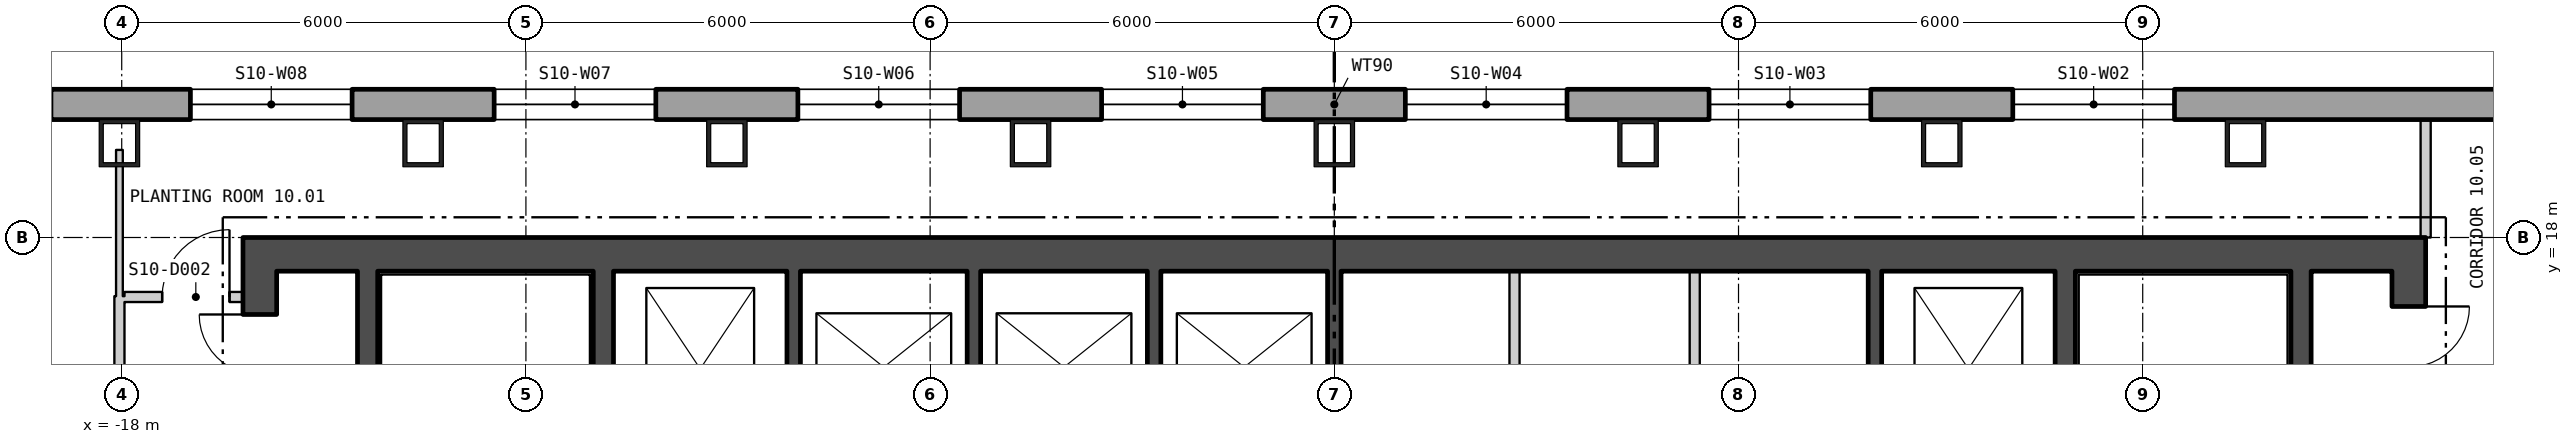
"""IFC4 building model, lengths in metres.
Left out: names, types, materials, properties, quantities, classifications, styles, units other than length and angle.
Written with IfcOpenShell. Run it as: python <this file> out.ifc"""

import sys

from ifc_helpers import new_model, si_unit, direction, frame, frame_2d, origin, origin_2d, place, context, subcontext, project, spatial, polyline, rectangle, hollow_rectangle, outline, extrude, element, fill, save


model = new_model("IFC4")
c1 = context("Model", 3, precision=1e-05, world=origin(), true_north=direction((0.0, 1.0)))
c2 = subcontext(c1, "Body", "Model", "MODEL_VIEW")
j1 = project(units=[si_unit("LENGTHUNIT", "METRE"), si_unit("PLANEANGLEUNIT", "RADIAN")], contexts=[c1])
p1 = place(None, origin())
s1 = spatial("IfcSite", under=j1, at=p1, CompositionType="ELEMENT")
p2 = place(p1, origin())
s2 = spatial("IfcBuilding", under=s1, at=p2, CompositionType="ELEMENT")
p3 = place(p2, frame((0.0, 0.0, 139.8)))
s3 = spatial("IfcBuildingStorey", under=s2, at=p3, CompositionType="ELEMENT", Elevation=139.8)
for number, where, z_axis, x_axis in (
    (1, (13.526, 19.4, 0.0), (0.0, 0.0, 1.0), (-1.0, 0.0, 0.0)),
    (2, (9.017, 19.4, 0.0), (0.0, 0.0, 1.0), (-1.0, 0.0, 0.0)),
    (3, (4.509, 19.4, 0.0), (0.0, 0.0, 1.0), (-1.0, 0.0, 0.0)),
    (4, (0.0, 19.4, 0.0), (0.0, 0.0, 1.0), (-1.0, 0.0, 0.0)),
    (5, (-4.509, 19.4, 0.0), (0.0, 0.0, 1.0), (-1.0, 0.0, 0.0)),
    (6, (-9.017, 19.4, 0.0), (0.0, 0.0, 1.0), (-1.0, 0.0, 0.0)),
    (7, (-13.526, 19.4, 0.0), (0.0, 0.0, 1.0), (-1.0, 0.0, 0.0)),
    (8, (-18.034, 19.4, 0.0), (0.0, 0.0, 1.0), (-1.0, 0.0, 0.0)),
):
    element("IfcColumn", number, at=place(p3, frame(where, z_axis=z_axis, x_axis=x_axis)), inside=s3, PredefinedType="COLUMN", context=c2, shape_type="SweptSolid", body=[
        extrude(hollow_rectangle(XDim=0.6, YDim=0.7, WallThickness=0.06, at=origin_2d()), origin(), (0.0, 0.0, 1.0), 3.9),
    ])
p4 = place(p3, frame((22.875, 19.975, -0.4), z_axis=(0.0, 0.0, 1.0), x_axis=(-1.0, 0.0, 0.0)))
e9 = element("IfcWall", 9, at=p4, inside=s3, PredefinedType="SOLIDWALL", context=c2, shape_type="SweptSolid", body=[
    extrude(outline(polyline([(-0.13, -0.225), (45.88, -0.225), (45.62, 0.225), (0.13, 0.225), (-0.13, -0.225)])), origin(), (0.0, 0.0, 1.0), 3.9),
])
p5 = place(p4, frame((1.425, 0.0, 1.3)))
e10 = element("IfcOpeningElement", 10, at=p5, cuts=e9, PredefinedType="OPENING", context=c2, shape_type="SweptSolid", body=[
    extrude(rectangle(XDim=2.4, YDim=2.0, at=frame_2d((1.2, 1.0))), frame((0.0, 0.235, 0.0), z_axis=(0.0, -1.0, 0.0), x_axis=(1.0, 0.0, 0.0)), (0.0, 0.0, 1.0), 0.47),
])
p6 = place(p4, frame((10.403, 0.0, 1.3)))
e11 = element("IfcOpeningElement", 11, at=p6, cuts=e9, PredefinedType="OPENING", context=c2, shape_type="SweptSolid", body=[
    extrude(rectangle(XDim=2.4, YDim=2.0, at=frame_2d((1.2, 1.0))), frame((0.0, 0.235, 0.0), z_axis=(0.0, -1.0, 0.0), x_axis=(1.0, 0.0, 0.0)), (0.0, 0.0, 1.0), 0.47),
])
p7 = place(p4, frame((14.912, 0.0, 1.3)))
e12 = element("IfcOpeningElement", 12, at=p7, cuts=e9, PredefinedType="OPENING", context=c2, shape_type="SweptSolid", body=[
    extrude(rectangle(XDim=2.4, YDim=2.0, at=frame_2d((1.2, 1.0))), frame((0.0, 0.235, 0.0), z_axis=(0.0, -1.0, 0.0), x_axis=(1.0, 0.0, 0.0)), (0.0, 0.0, 1.0), 0.47),
])
p8 = place(p4, frame((19.421, 0.0, 1.3)))
e13 = element("IfcOpeningElement", 13, at=p8, cuts=e9, PredefinedType="OPENING", context=c2, shape_type="SweptSolid", body=[
    extrude(rectangle(XDim=2.4, YDim=2.0, at=frame_2d((1.2, 1.0))), frame((0.0, 0.235, 0.0), z_axis=(0.0, -1.0, 0.0), x_axis=(1.0, 0.0, 0.0)), (0.0, 0.0, 1.0), 0.47),
])
p9 = place(p4, frame((23.929, 0.0, 1.3)))
e14 = element("IfcOpeningElement", 14, at=p9, cuts=e9, PredefinedType="OPENING", context=c2, shape_type="SweptSolid", body=[
    extrude(rectangle(XDim=2.4, YDim=2.0, at=frame_2d((1.2, 1.0))), frame((0.0, 0.235, 0.0), z_axis=(0.0, -1.0, 0.0), x_axis=(1.0, 0.0, 0.0)), (0.0, 0.0, 1.0), 0.47),
])
p10 = place(p4, frame((28.438, 0.0, 1.3)))
e15 = element("IfcOpeningElement", 15, at=p10, cuts=e9, PredefinedType="OPENING", context=c2, shape_type="SweptSolid", body=[
    extrude(rectangle(XDim=2.4, YDim=2.0, at=frame_2d((1.2, 1.0))), frame((0.0, 0.235, 0.0), z_axis=(0.0, -1.0, 0.0), x_axis=(1.0, 0.0, 0.0)), (0.0, 0.0, 1.0), 0.47),
])
p11 = place(p4, frame((32.947, 0.0, 1.3)))
e16 = element("IfcOpeningElement", 16, at=p11, cuts=e9, PredefinedType="OPENING", context=c2, shape_type="SweptSolid", body=[
    extrude(rectangle(XDim=2.4, YDim=2.0, at=frame_2d((1.2, 1.0))), frame((0.0, 0.235, 0.0), z_axis=(0.0, -1.0, 0.0), x_axis=(1.0, 0.0, 0.0)), (0.0, 0.0, 1.0), 0.47),
])
p12 = place(p4, frame((37.455, 0.0, 1.3)))
e17 = element("IfcOpeningElement", 17, at=p12, cuts=e9, PredefinedType="OPENING", context=c2, shape_type="SweptSolid", body=[
    extrude(rectangle(XDim=2.4, YDim=2.0, at=frame_2d((1.2, 1.0))), frame((0.0, 0.235, 0.0), z_axis=(0.0, -1.0, 0.0), x_axis=(1.0, 0.0, 0.0)), (0.0, 0.0, 1.0), 0.47),
])
p13 = place(p4, frame((41.925, 0.0, 1.3)))
e18 = element("IfcOpeningElement", 18, at=p13, cuts=e9, PredefinedType="OPENING", context=c2, shape_type="SweptSolid", body=[
    extrude(rectangle(XDim=2.4, YDim=2.0, at=frame_2d((1.2, 1.0))), frame((0.0, 0.235, 0.0), z_axis=(0.0, -1.0, 0.0), x_axis=(1.0, 0.0, 0.0)), (0.0, 0.0, 1.0), 0.47),
])
p14 = place(p3, frame((-16.2, 17.75, 0.0), z_axis=(0.0, 0.0, 1.0), x_axis=(1.0, 0.0, 0.0)))
e19 = element("IfcWall", 19, at=p14, inside=s3, PredefinedType="SHEAR", context=c2, shape_type="SweptSolid", body=[
    extrude(rectangle(XDim=32.4, YDim=0.5, at=frame_2d((16.2, 0.0))), origin(), (0.0, 0.0, 1.0), 3.7),
])
p15 = place(p3, frame((-15.95, 2.5, 0.0), z_axis=(0.0, 0.0, 1.0), x_axis=(0.0, 1.0, 0.0)))
e20 = element("IfcWall", 20, at=p15, inside=s3, PredefinedType="SHEAR", context=c2, shape_type="SweptSolid", body=[
    extrude(rectangle(XDim=15.0, YDim=0.5, at=frame_2d((7.5, 0.0))), origin(), (0.0, 0.0, 1.0), 3.7),
])
p16 = place(p15, frame((4.35, 0.0, 0.0)))
e21 = element("IfcOpeningElement", 21, at=p16, cuts=e20, PredefinedType="OPENING", context=c2, shape_type="SweptSolid", body=[
    extrude(rectangle(XDim=1.5, YDim=2.1, at=frame_2d((0.75, 1.05))), frame((0.0, 0.26, 0.0), z_axis=(0.0, -1.0, 0.0), x_axis=(1.0, 0.0, 0.0)), (0.0, 0.0, 1.0), 0.52),
])
p17 = place(p15, frame((0.825, 0.0, 0.0)))
e22 = element("IfcOpeningElement", 22, at=p17, cuts=e20, PredefinedType="OPENING", context=c2, shape_type="SweptSolid", body=[
    extrude(rectangle(XDim=0.9, YDim=2.1, at=frame_2d((0.45, 1.05))), frame((0.0, 0.26, 0.0), z_axis=(0.0, -1.0, 0.0), x_axis=(1.0, 0.0, 0.0)), (0.0, 0.0, 1.0), 0.52),
])
p18 = place(p15, frame((2.95, 0.0, 0.0)))
e23 = element("IfcOpeningElement", 23, at=p18, cuts=e20, PredefinedType="OPENING", context=c2, shape_type="SweptSolid", body=[
    extrude(rectangle(XDim=1.0, YDim=2.1, at=frame_2d((0.5, 1.05))), frame((0.0, 0.26, 0.0), z_axis=(0.0, -1.0, 0.0), x_axis=(1.0, 0.0, 0.0)), (0.0, 0.0, 1.0), 0.52),
])
p19 = place(p15, frame((8.882, 0.0, 0.0)))
e24 = element("IfcOpeningElement", 24, at=p19, cuts=e20, PredefinedType="OPENING", context=c2, shape_type="SweptSolid", body=[
    extrude(rectangle(XDim=0.9, YDim=2.1, at=frame_2d((0.45, 1.05))), frame((0.0, 0.26, 0.0), z_axis=(0.0, -1.0, 0.0), x_axis=(1.0, 0.0, 0.0)), (0.0, 0.0, 1.0), 0.52),
])
p20 = place(p15, frame((13.457, 0.0, 0.0)))
e25 = element("IfcOpeningElement", 25, at=p20, cuts=e20, PredefinedType="OPENING", context=c2, shape_type="SweptSolid", body=[
    extrude(rectangle(XDim=0.9, YDim=2.1, at=frame_2d((0.45, 1.05))), frame((0.0, 0.26, 0.0), z_axis=(0.0, -1.0, 0.0), x_axis=(1.0, 0.0, 0.0)), (0.0, 0.0, 1.0), 0.52),
])
p21 = place(p3, frame((15.95, 2.5, 0.0), z_axis=(0.0, 0.0, 1.0), x_axis=(0.0, 1.0, 0.0)))
e26 = element("IfcWall", 26, at=p21, inside=s3, PredefinedType="SHEAR", context=c2, shape_type="SweptSolid", body=[
    extrude(rectangle(XDim=15.0, YDim=0.5, at=frame_2d((7.5, 0.0))), origin(), (0.0, 0.0, 1.0), 3.7),
])
p22 = place(p21, frame((4.35, 0.0, 0.0)))
e27 = element("IfcOpeningElement", 27, at=p22, cuts=e26, PredefinedType="OPENING", context=c2, shape_type="SweptSolid", body=[
    extrude(rectangle(XDim=1.5, YDim=2.1, at=frame_2d((0.75, 1.05))), frame((0.0, 0.26, 0.0), z_axis=(0.0, -1.0, 0.0), x_axis=(1.0, 0.0, 0.0)), (0.0, 0.0, 1.0), 0.52),
])
p23 = place(p21, frame((0.4, 0.0, 0.0)))
e28 = element("IfcOpeningElement", 28, at=p23, cuts=e26, PredefinedType="OPENING", context=c2, shape_type="SweptSolid", body=[
    extrude(rectangle(XDim=1.0, YDim=2.1, at=frame_2d((0.5, 1.05))), frame((0.0, 0.26, 0.0), z_axis=(0.0, -1.0, 0.0), x_axis=(1.0, 0.0, 0.0)), (0.0, 0.0, 1.0), 0.52),
])
p24 = place(p21, frame((2.475, 0.0, 0.0)))
e29 = element("IfcOpeningElement", 29, at=p24, cuts=e26, PredefinedType="OPENING", context=c2, shape_type="SweptSolid", body=[
    extrude(rectangle(XDim=0.9, YDim=2.1, at=frame_2d((0.45, 1.05))), frame((0.0, 0.26, 0.0), z_axis=(0.0, -1.0, 0.0), x_axis=(1.0, 0.0, 0.0)), (0.0, 0.0, 1.0), 0.52),
])
p25 = place(p21, frame((9.001, 0.0, 0.0)))
e30 = element("IfcOpeningElement", 30, at=p25, cuts=e26, PredefinedType="OPENING", context=c2, shape_type="SweptSolid", body=[
    extrude(rectangle(XDim=0.9, YDim=2.1, at=frame_2d((0.45, 1.05))), frame((0.0, 0.26, 0.0), z_axis=(0.0, -1.0, 0.0), x_axis=(1.0, 0.0, 0.0)), (0.0, 0.0, 1.0), 0.52),
])
p26 = place(p21, frame((13.576, 0.0, 0.0)))
e31 = element("IfcOpeningElement", 31, at=p26, cuts=e26, PredefinedType="OPENING", context=c2, shape_type="SweptSolid", body=[
    extrude(rectangle(XDim=0.9, YDim=2.1, at=frame_2d((0.45, 1.05))), frame((0.0, 0.26, 0.0), z_axis=(0.0, -1.0, 0.0), x_axis=(1.0, 0.0, 0.0)), (0.0, 0.0, 1.0), 0.52),
])
p27 = place(p3, frame((-10.85, 2.5, 0.0), z_axis=(0.0, 0.0, 1.0), x_axis=(0.0, 1.0, 0.0)))
e32 = element("IfcWall", 32, at=p27, inside=s3, PredefinedType="SHEAR", context=c2, shape_type="SweptSolid", body=[
    extrude(rectangle(XDim=15.0, YDim=0.3, at=frame_2d((7.5, 0.0))), origin(), (0.0, 0.0, 1.0), 3.7),
])
p28 = place(p27, frame((3.475, 0.0, 0.0)))
e33 = element("IfcOpeningElement", 33, at=p28, cuts=e32, PredefinedType="OPENING", context=c2, shape_type="SweptSolid", body=[
    extrude(rectangle(XDim=1.25, YDim=2.1, at=frame_2d((0.625, 1.05))), frame((0.0, 0.16, 0.0), z_axis=(0.0, -1.0, 0.0), x_axis=(1.0, 0.0, 0.0)), (0.0, 0.0, 1.0), 0.32),
])
p29 = place(p27, frame((1.125, 0.0, 0.0)))
e34 = element("IfcOpeningElement", 34, at=p29, cuts=e32, PredefinedType="OPENING", context=c2, shape_type="SweptSolid", body=[
    extrude(rectangle(XDim=1.0, YDim=2.1, at=frame_2d((0.5, 1.05))), frame((0.0, 0.16, 0.0), z_axis=(0.0, -1.0, 0.0), x_axis=(1.0, 0.0, 0.0)), (0.0, 0.0, 1.0), 0.32),
])
p30 = place(p3, frame((-14.35, 2.5, 0.0), z_axis=(0.0, 0.0, 1.0), x_axis=(0.0, 1.0, 0.0)))
e35 = element("IfcWall", 35, at=p30, inside=s3, PredefinedType="SHEAR", context=c2, shape_type="SweptSolid", body=[
    extrude(rectangle(XDim=15.0, YDim=0.3, at=frame_2d((7.5, 0.0))), origin(), (0.0, 0.0, 1.0), 3.7),
])
p31 = place(p30, frame((4.35, 0.0, 0.0)))
e36 = element("IfcOpeningElement", 36, at=p31, cuts=e35, PredefinedType="OPENING", context=c2, shape_type="SweptSolid", body=[
    extrude(rectangle(XDim=1.5, YDim=2.1, at=frame_2d((0.75, 1.05))), frame((0.0, 0.16, 0.0), z_axis=(0.0, -1.0, 0.0), x_axis=(1.0, 0.0, 0.0)), (0.0, 0.0, 1.0), 0.32),
])
p32 = place(p3, frame((10.85, 2.5, 0.0), z_axis=(0.0, 0.0, 1.0), x_axis=(0.0, 1.0, 0.0)))
e37 = element("IfcWall", 37, at=p32, inside=s3, PredefinedType="SHEAR", context=c2, shape_type="SweptSolid", body=[
    extrude(rectangle(XDim=15.0, YDim=0.3, at=frame_2d((7.5, 0.0))), origin(), (0.0, 0.0, 1.0), 3.7),
])
p33 = place(p32, frame((3.475, 0.0, 0.0)))
e38 = element("IfcOpeningElement", 38, at=p33, cuts=e37, PredefinedType="OPENING", context=c2, shape_type="SweptSolid", body=[
    extrude(rectangle(XDim=1.25, YDim=2.1, at=frame_2d((0.625, 1.05))), frame((0.0, 0.16, 0.0), z_axis=(0.0, -1.0, 0.0), x_axis=(1.0, 0.0, 0.0)), (0.0, 0.0, 1.0), 0.32),
])
p34 = place(p32, frame((1.125, 0.0, 0.0)))
e39 = element("IfcOpeningElement", 39, at=p34, cuts=e37, PredefinedType="OPENING", context=c2, shape_type="SweptSolid", body=[
    extrude(rectangle(XDim=1.0, YDim=2.1, at=frame_2d((0.5, 1.05))), frame((0.0, 0.16, 0.0), z_axis=(0.0, -1.0, 0.0), x_axis=(1.0, 0.0, 0.0)), (0.0, 0.0, 1.0), 0.32),
])
p35 = place(p3, frame((14.35, 2.5, 0.0), z_axis=(0.0, 0.0, 1.0), x_axis=(0.0, 1.0, 0.0)))
e40 = element("IfcWall", 40, at=p35, inside=s3, PredefinedType="SHEAR", context=c2, shape_type="SweptSolid", body=[
    extrude(rectangle(XDim=15.0, YDim=0.3, at=frame_2d((7.5, 0.0))), origin(), (0.0, 0.0, 1.0), 3.7),
])
p36 = place(p35, frame((4.35, 0.0, 0.0)))
e41 = element("IfcOpeningElement", 41, at=p36, cuts=e40, PredefinedType="OPENING", context=c2, shape_type="SweptSolid", body=[
    extrude(rectangle(XDim=1.5, YDim=2.1, at=frame_2d((0.75, 1.05))), frame((0.0, 0.16, 0.0), z_axis=(0.0, -1.0, 0.0), x_axis=(1.0, 0.0, 0.0)), (0.0, 0.0, 1.0), 0.32),
])
for number, where, z_axis, x_axis in (
    (42, (-8.025, 14.7, 0.0), (0.0, 0.0, 1.0), (0.0, 1.0, 0.0)),
    (43, (-5.35, 14.7, 0.0), (0.0, 0.0, 1.0), (0.0, 1.0, 0.0)),
    (44, (-2.675, 14.7, 0.0), (0.0, 0.0, 1.0), (0.0, 1.0, 0.0)),
    (45, (0.0, 14.7, 0.0), (0.0, 0.0, 1.0), (0.0, 1.0, 0.0)),
):
    element("IfcWall", number, at=place(p3, frame(where, z_axis=z_axis, x_axis=x_axis)), inside=s3, PredefinedType="SHEAR", context=c2, shape_type="SweptSolid", body=[
        extrude(rectangle(XDim=2.8, YDim=0.2, at=frame_2d((1.4, 0.0))), origin(), (0.0, 0.0, 1.0), 3.7),
    ])
for number, where, z_axis, x_axis in (
    (46, (2.675, 14.7, 0.0), (0.0, 0.0, 1.0), (0.0, 1.0, 0.0)),
    (47, (5.35, 14.7, 0.0), (0.0, 0.0, 1.0), (0.0, 1.0, 0.0)),
):
    element("IfcWall", number, at=place(p3, frame(where, z_axis=z_axis, x_axis=x_axis)), inside=s3, PredefinedType="PARTITIONING", context=c2, shape_type="SweptSolid", body=[
        extrude(rectangle(XDim=2.8, YDim=0.15, at=frame_2d((1.4, 0.0))), origin(), (0.0, 0.0, 1.0), 3.7),
    ])
p37 = place(p3, frame((8.025, 14.7, 0.0), z_axis=(0.0, 0.0, 1.0), x_axis=(0.0, 1.0, 0.0)))
e48 = element("IfcWall", 48, at=p37, inside=s3, PredefinedType="SHEAR", context=c2, shape_type="SweptSolid", body=[
    extrude(rectangle(XDim=2.8, YDim=0.2, at=frame_2d((1.4, 0.0))), origin(), (0.0, 0.0, 1.0), 3.7),
])
p38 = place(p3, frame((-18.034, 12.146, 0.0), z_axis=(0.0, 0.0, 1.0), x_axis=(0.0, 1.0, 0.0)))
e49 = element("IfcWall", 49, at=p38, inside=s3, PredefinedType="PARTITIONING", context=c2, shape_type="SweptSolid", body=[
    extrude(rectangle(XDim=4.983, YDim=0.15, at=frame_2d((2.491, 0.0))), origin(), (0.0, 0.0, 1.0), 3.7),
])
p39 = place(p38, frame((1.916, 0.0, 0.0)))
e50 = element("IfcOpeningElement", 50, at=p39, cuts=e49, PredefinedType="OPENING", context=c2, shape_type="SweptSolid", body=[
    extrude(rectangle(XDim=1.0, YDim=2.1, at=frame_2d((0.5, 1.05))), frame((0.0, 0.085, 0.0), z_axis=(0.0, -1.0, 0.0), x_axis=(1.0, 0.0, 0.0)), (0.0, 0.0, 1.0), 0.17),
])
p40 = place(p3, frame((-18.034, 17.129, 0.0), z_axis=(0.0, 0.0, 1.0), x_axis=(0.0, 1.0, 0.0)))
e51 = element("IfcWall", 51, at=p40, inside=s3, PredefinedType="PARTITIONING", context=c2, shape_type="SweptSolid", body=[
    extrude(rectangle(XDim=2.171, YDim=0.1, at=frame_2d((1.085, 0.0))), origin(), (0.0, 0.0, 1.0), 3.7),
])
p41 = place(p3, frame((-17.959, 17.117, 0.0), z_axis=(0.0, 0.0, 1.0), x_axis=(1.0, 0.0, 0.0)))
e52 = element("IfcWall", 52, at=p41, inside=s3, PredefinedType="PARTITIONING", context=c2, shape_type="SweptSolid", body=[
    extrude(rectangle(XDim=1.759, YDim=0.15, at=frame_2d((0.879, 0.0))), origin(), (0.0, 0.0, 1.0), 3.7),
])
p42 = place(p41, frame((0.559, 0.0, 0.0)))
e53 = element("IfcOpeningElement", 53, at=p42, cuts=e52, PredefinedType="OPENING", context=c2, shape_type="SweptSolid", body=[
    extrude(rectangle(XDim=1.0, YDim=2.1, at=frame_2d((0.5, 1.05))), frame((0.0, 0.085, 0.0), z_axis=(0.0, -1.0, 0.0), x_axis=(1.0, 0.0, 0.0)), (0.0, 0.0, 1.0), 0.17),
])
p43 = place(p3, frame((16.2, 18.0, 0.0), z_axis=(0.0, 0.0, 1.0), x_axis=(0.0, 1.0, 0.0)))
e54 = element("IfcWall", 54, at=p43, inside=s3, PredefinedType="PARTITIONING", context=c2, shape_type="SweptSolid", body=[
    extrude(rectangle(XDim=1.75, YDim=0.15, at=frame_2d((0.875, 0.0))), origin(), (0.0, 0.0, 1.0), 3.7),
])
p44 = place(p6, origin())
e55 = element("IfcWindow", 55, at=p44, inside=s3, PartitioningType="SINGLE_PANEL", PredefinedType="WINDOW", context=c2, shape_type="SweptSolid", body=[
    extrude(rectangle(XDim=2.4, YDim=2.0, at=frame_2d((1.2, 1.0))), frame((0.0, 0.105, 0.0), z_axis=(0.0, -1.0, 0.0), x_axis=(1.0, 0.0, 0.0)), (0.0, 0.0, 1.0), 0.06),
])
fill(e11, e55)
p45 = place(p7, origin())
e56 = element("IfcWindow", 56, at=p45, inside=s3, PartitioningType="SINGLE_PANEL", PredefinedType="WINDOW", context=c2, shape_type="SweptSolid", body=[
    extrude(rectangle(XDim=2.4, YDim=2.0, at=frame_2d((1.2, 1.0))), frame((0.0, 0.105, 0.0), z_axis=(0.0, -1.0, 0.0), x_axis=(1.0, 0.0, 0.0)), (0.0, 0.0, 1.0), 0.06),
])
fill(e12, e56)
p46 = place(p8, origin())
e57 = element("IfcWindow", 57, at=p46, inside=s3, PartitioningType="SINGLE_PANEL", PredefinedType="WINDOW", context=c2, shape_type="SweptSolid", body=[
    extrude(rectangle(XDim=2.4, YDim=2.0, at=frame_2d((1.2, 1.0))), frame((0.0, 0.105, 0.0), z_axis=(0.0, -1.0, 0.0), x_axis=(1.0, 0.0, 0.0)), (0.0, 0.0, 1.0), 0.06),
])
fill(e13, e57)
p47 = place(p9, origin())
e58 = element("IfcWindow", 58, at=p47, inside=s3, PartitioningType="SINGLE_PANEL", PredefinedType="WINDOW", context=c2, shape_type="SweptSolid", body=[
    extrude(rectangle(XDim=2.4, YDim=2.0, at=frame_2d((1.2, 1.0))), frame((0.0, 0.105, 0.0), z_axis=(0.0, -1.0, 0.0), x_axis=(1.0, 0.0, 0.0)), (0.0, 0.0, 1.0), 0.06),
])
fill(e14, e58)
p48 = place(p10, origin())
e59 = element("IfcWindow", 59, at=p48, inside=s3, PartitioningType="SINGLE_PANEL", PredefinedType="WINDOW", context=c2, shape_type="SweptSolid", body=[
    extrude(rectangle(XDim=2.4, YDim=2.0, at=frame_2d((1.2, 1.0))), frame((0.0, 0.105, 0.0), z_axis=(0.0, -1.0, 0.0), x_axis=(1.0, 0.0, 0.0)), (0.0, 0.0, 1.0), 0.06),
])
fill(e15, e59)
p49 = place(p11, origin())
e60 = element("IfcWindow", 60, at=p49, inside=s3, PartitioningType="SINGLE_PANEL", PredefinedType="WINDOW", context=c2, shape_type="SweptSolid", body=[
    extrude(rectangle(XDim=2.4, YDim=2.0, at=frame_2d((1.2, 1.0))), frame((0.0, 0.105, 0.0), z_axis=(0.0, -1.0, 0.0), x_axis=(1.0, 0.0, 0.0)), (0.0, 0.0, 1.0), 0.06),
])
fill(e16, e60)
p50 = place(p12, origin())
e61 = element("IfcWindow", 61, at=p50, inside=s3, PartitioningType="SINGLE_PANEL", PredefinedType="WINDOW", context=c2, shape_type="SweptSolid", body=[
    extrude(rectangle(XDim=2.4, YDim=2.0, at=frame_2d((1.2, 1.0))), frame((0.0, 0.105, 0.0), z_axis=(0.0, -1.0, 0.0), x_axis=(1.0, 0.0, 0.0)), (0.0, 0.0, 1.0), 0.06),
])
fill(e17, e61)
p51 = place(p20, origin())
e62 = element("IfcDoor", 62, at=p51, inside=s3, OperationType="SINGLE_SWING_LEFT", PredefinedType="DOOR", context=c2, shape_type="SweptSolid", body=[
    extrude(rectangle(XDim=0.9, YDim=2.1, at=frame_2d((0.45, 1.05))), frame((0.0, 0.025, 0.0), z_axis=(0.0, -1.0, 0.0), x_axis=(1.0, 0.0, 0.0)), (0.0, 0.0, 1.0), 0.05),
])
fill(e25, e62)
p52 = place(p26, origin())
e63 = element("IfcDoor", 63, at=p52, inside=s3, OperationType="SINGLE_SWING_RIGHT", PredefinedType="DOOR", context=c2, shape_type="SweptSolid", body=[
    extrude(rectangle(XDim=0.9, YDim=2.1, at=frame_2d((0.45, 1.05))), frame((0.0, 0.025, 0.0), z_axis=(0.0, -1.0, 0.0), x_axis=(1.0, 0.0, 0.0)), (0.0, 0.0, 1.0), 0.05),
])
fill(e31, e63)
p53 = place(p42, origin())
e64 = element("IfcDoor", 64, at=p53, inside=s3, OperationType="SINGLE_SWING_LEFT", PredefinedType="DOOR", context=c2, shape_type="SweptSolid", body=[
    extrude(rectangle(XDim=1.0, YDim=2.1, at=frame_2d((0.5, 1.05))), frame((0.0, 0.025, 0.0), z_axis=(0.0, -1.0, 0.0), x_axis=(1.0, 0.0, 0.0)), (0.0, 0.0, 1.0), 0.05),
])
fill(e53, e64)
save(model, sys.argv[1])
